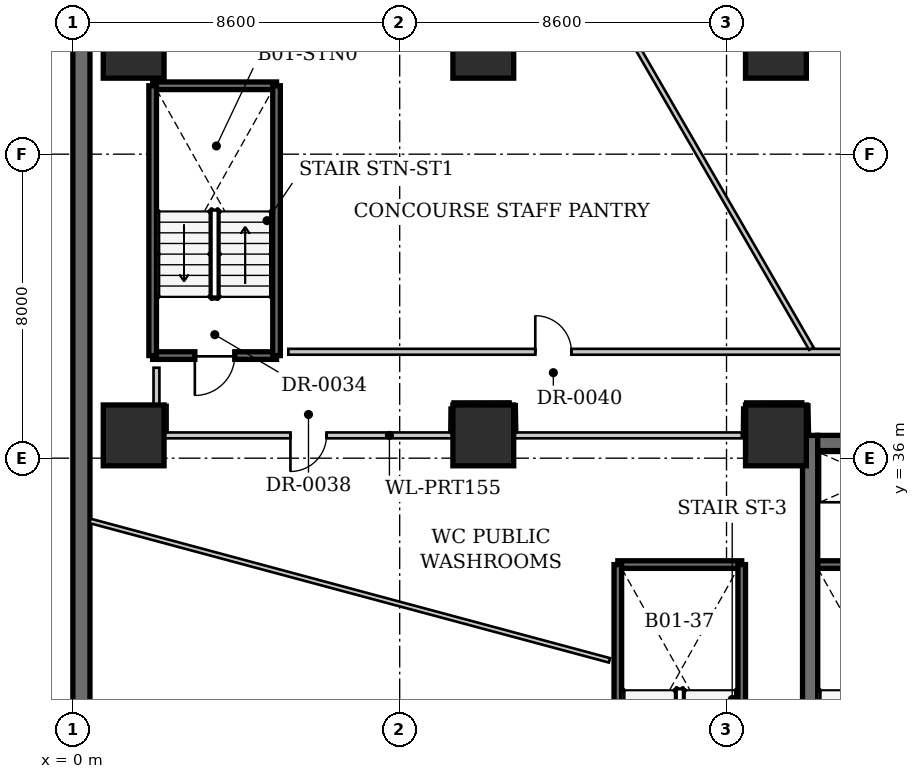
"""IFC4 building model, lengths in metres.
Left out: names, types, materials, properties, quantities, classifications, styles, units other than length and angle.
Written with IfcOpenShell. Run it as: python <this file> out.ifc"""

import sys

from ifc_helpers import new_model, si_unit, direction, frame, frame_2d, origin, origin_2d, place, context, subcontext, project, spatial, rectangle, extrude, source, transform, mapped, element, fill, save


model = new_model("IFC4")
c1 = context("Model", 3, precision=1e-05, world=origin(), true_north=direction((0.0, 1.0)))
c2 = subcontext(c1, "Body", "Model", "MODEL_VIEW")
j1 = project(units=[si_unit("LENGTHUNIT", "METRE"), si_unit("PLANEANGLEUNIT", "RADIAN")], contexts=[c1])
p1 = place(None, origin())
s1 = spatial("IfcSite", under=j1, at=p1, CompositionType="ELEMENT")
p2 = place(p1, origin())
s2 = spatial("IfcBuilding", under=s1, at=p2, CompositionType="ELEMENT")
p3 = place(p2, frame((0.0, 0.0, -5.8)))
s3 = spatial("IfcBuildingStorey", under=s2, at=p3, CompositionType="ELEMENT", Elevation=-5.8)
for number, where, z_axis, x_axis in (
    (1, (1.6, 36.6, 0.0), (0.0, 0.0, 1.0), (1.0, 0.0, 0.0)),
    (2, (1.6, 46.8, 0.0), (0.0, 0.0, 1.0), (1.0, 0.0, 0.0)),
    (3, (10.8, 46.8, 0.0), (0.0, 0.0, 1.0), (1.0, 0.0, 0.0)),
    (4, (18.5, 46.8, 0.0), (0.0, 0.0, 1.0), (1.0, 0.0, 0.0)),
    (5, (10.8, 36.6, 0.0), (0.0, 0.0, 1.0), (1.0, 0.0, 0.0)),
    (6, (18.5, 36.6, 0.0), (0.0, 0.0, 1.0), (1.0, 0.0, 0.0)),
):
    element("IfcColumn", number, at=place(p3, frame(where, z_axis=z_axis, x_axis=x_axis)), inside=s3, PredefinedType="COLUMN", context=c2, shape_type="SweptSolid", body=[
        extrude(rectangle(XDim=1.6, YDim=1.6, at=origin_2d()), origin(), (0.0, 0.0, 1.0), 5.45),
    ])
p4 = place(p3, frame((0.225, 8.225, 0.0), z_axis=(0.0, 0.0, 1.0), x_axis=(0.0, 1.0, 0.0)))
e7 = element("IfcWall", 7, at=p4, inside=s3, PredefinedType="SHEAR", context=c2, shape_type="SweptSolid", body=[
    extrude(rectangle(XDim=39.55, YDim=0.45, at=frame_2d((19.775, 0.0))), origin(), (0.0, 0.0, 1.0), 5.8),
])
p5 = place(p3, frame((19.4, 25.8, 0.0), z_axis=(0.0, 0.0, 1.0), x_axis=(0.0, 1.0, 0.0)))
e8 = element("IfcWall", 8, at=p5, inside=s3, PredefinedType="SHEAR", context=c2, shape_type="SweptSolid", body=[
    extrude(rectangle(XDim=10.8, YDim=0.4, at=frame_2d((5.4, 0.0))), origin(), (0.0, 0.0, 1.0), 5.8),
])
p6 = place(p3, frame((19.6, 36.4, 0.0), z_axis=(0.0, 0.0, 1.0), x_axis=(1.0, 0.0, 0.0)))
e9 = element("IfcWall", 9, at=p6, inside=s3, PredefinedType="SHEAR", context=c2, shape_type="SweptSolid", body=[
    extrude(rectangle(XDim=12.8, YDim=0.4, at=frame_2d((6.4, 0.0))), origin(), (0.0, 0.0, 1.0), 5.8),
])
p7 = place(p3, frame((19.6, 33.2, 0.0), z_axis=(0.0, 0.0, 1.0), x_axis=(1.0, 0.0, 0.0)))
e10 = element("IfcWall", 10, at=p7, inside=s3, PredefinedType="SHEAR", context=c2, shape_type="SweptSolid", body=[
    extrude(rectangle(XDim=3.06, YDim=0.2, at=frame_2d((1.53, 0.0))), origin(), (0.0, 0.0, 1.0), 5.8),
])
p8 = place(p3, frame((14.34, 33.2, 0.0), z_axis=(0.0, 0.0, 1.0), x_axis=(1.0, 0.0, 0.0)))
e11 = element("IfcWall", 11, at=p8, inside=s3, PredefinedType="SHEAR", context=c2, shape_type="SweptSolid", body=[
    extrude(rectangle(XDim=3.26, YDim=0.2, at=frame_2d((1.63, 0.0))), origin(), (0.0, 0.0, 1.0), 5.8),
])
for number, where, z_axis, x_axis in (
    (12, (14.34, 26.1, 0.0), (0.0, 0.0, 1.0), (0.0, 1.0, 0.0)),
    (13, (17.6, 26.1, 0.0), (0.0, 0.0, 1.0), (0.0, 1.0, 0.0)),
):
    element("IfcWall", number, at=place(p3, frame(where, z_axis=z_axis, x_axis=x_axis)), inside=s3, PredefinedType="SHEAR", context=c2, shape_type="SweptSolid", body=[
        extrude(rectangle(XDim=7.1, YDim=0.2, at=frame_2d((3.55, 0.0))), origin(), (0.0, 0.0, 1.0), 5.8),
    ])
p9 = place(p3, frame((5.36, 38.7, 0.0), z_axis=(0.0, 0.0, 1.0), x_axis=(-1.0, 0.0, 0.0)))
e14 = element("IfcWall", 14, at=p9, inside=s3, PredefinedType="SHEAR", context=c2, shape_type="SweptSolid", body=[
    extrude(rectangle(XDim=3.26, YDim=0.2, at=frame_2d((1.63, 0.0))), origin(), (0.0, 0.0, 1.0), 5.8),
])
p10 = place(p9, frame((1.1, 0.0, 0.0)))
e15 = element("IfcOpeningElement", 15, at=p10, cuts=e14, PredefinedType="OPENING", context=c2, shape_type="SweptSolid", body=[
    extrude(rectangle(XDim=1.05, YDim=2.15, at=frame_2d((0.525, 1.075))), frame((0.0, 0.11, 0.0), z_axis=(0.0, -1.0, 0.0), x_axis=(1.0, 0.0, 0.0)), (0.0, 0.0, 1.0), 0.22),
])
p11 = place(p3, frame((2.1, 45.8, 0.0), z_axis=(0.0, 0.0, 1.0), x_axis=(1.0, 0.0, 0.0)))
e16 = element("IfcWall", 16, at=p11, inside=s3, PredefinedType="SHEAR", context=c2, shape_type="SweptSolid", body=[
    extrude(rectangle(XDim=3.26, YDim=0.2, at=frame_2d((1.63, 0.0))), origin(), (0.0, 0.0, 1.0), 5.8),
])
for number, where, z_axis, x_axis in (
    (17, (2.1, 38.7, 0.0), (0.0, 0.0, 1.0), (0.0, 1.0, 0.0)),
    (18, (5.36, 38.7, 0.0), (0.0, 0.0, 1.0), (0.0, 1.0, 0.0)),
):
    element("IfcWall", number, at=place(p3, frame(where, z_axis=z_axis, x_axis=x_axis)), inside=s3, PredefinedType="SHEAR", context=c2, shape_type="SweptSolid", body=[
        extrude(rectangle(XDim=7.1, YDim=0.2, at=frame_2d((3.55, 0.0))), origin(), (0.0, 0.0, 1.0), 5.8),
    ])
p12 = place(p3, frame((9.985, 36.6, 0.0), z_axis=(0.0, 0.0, 1.0), x_axis=(-1.0, 0.0, 0.0)))
e19 = element("IfcWall", 19, at=p12, inside=s3, PredefinedType="PARTITIONING", context=c2, shape_type="SweptSolid", body=[
    extrude(rectangle(XDim=7.57, YDim=0.155, at=frame_2d((3.785, 0.0))), origin(), (0.0, 0.0, 1.0), 4.225),
])
p13 = place(p12, frame((3.31, 0.0, 0.0)))
e20 = element("IfcOpeningElement", 20, at=p13, cuts=e19, PredefinedType="OPENING", context=c2, shape_type="SweptSolid", body=[
    extrude(rectangle(XDim=0.95, YDim=2.15, at=frame_2d((0.475, 1.075))), frame((0.0, 0.087, 0.0), z_axis=(0.0, -1.0, 0.0), x_axis=(1.0, 0.0, 0.0)), (0.0, 0.0, 1.0), 0.175),
])
p14 = place(p3, frame((5.67, 38.8, 0.0), z_axis=(0.0, 0.0, 1.0), x_axis=(1.0, 0.0, 0.0)))
e21 = element("IfcWall", 21, at=p14, inside=s3, PredefinedType="PARTITIONING", context=c2, shape_type="SweptSolid", body=[
    extrude(rectangle(XDim=30.13, YDim=0.155, at=frame_2d((15.065, 0.0))), origin(), (0.0, 0.0, 1.0), 5.45),
])
p15 = place(p14, frame((19.224, 0.0, 0.0)))
e22 = element("IfcOpeningElement", 22, at=p15, cuts=e21, PredefinedType="OPENING", context=c2, shape_type="SweptSolid", body=[
    extrude(rectangle(XDim=0.95, YDim=2.15, at=frame_2d((0.475, 1.075))), frame((0.0, 0.087, 0.0), z_axis=(0.0, -1.0, 0.0), x_axis=(1.0, 0.0, 0.0)), (0.0, 0.0, 1.0), 0.175),
])
p16 = place(p14, frame((6.498, 0.0, 0.0)))
e23 = element("IfcOpeningElement", 23, at=p16, cuts=e21, PredefinedType="OPENING", context=c2, shape_type="SweptSolid", body=[
    extrude(rectangle(XDim=0.95, YDim=2.15, at=frame_2d((0.475, 1.075))), frame((0.0, 0.087, 0.0), z_axis=(0.0, -1.0, 0.0), x_axis=(1.0, 0.0, 0.0)), (0.0, 0.0, 1.0), 0.175),
])
p17 = place(p3, frame((19.315, 36.67, 0.0), z_axis=(0.0, 0.0, 1.0), x_axis=(-0.019982902894, 0.99980032186, 0.0)))
e24 = element("IfcWall", 24, at=p17, inside=s3, PredefinedType="PARTITIONING", context=c2, shape_type="SweptSolid", body=[
    extrude(rectangle(XDim=0.745, YDim=0.155, at=frame_2d((0.373, 0.0))), origin(), (0.0, 0.0, 1.0), 5.45),
])
p18 = place(p3, frame((19.217, 37.415, 0.0), z_axis=(0.0, 0.0, 1.0), x_axis=(-0.99999937099, -0.00112161442, 0.0)))
e25 = element("IfcWall", 25, at=p18, inside=s3, PredefinedType="PARTITIONING", context=c2, shape_type="SweptSolid", body=[
    extrude(rectangle(XDim=1.524, YDim=0.155, at=frame_2d((0.762, 0.0))), origin(), (0.0, 0.0, 1.0), 5.45),
])
p19 = place(p3, frame((17.692, 37.33, 0.0), z_axis=(0.0, 0.0, 1.0), x_axis=(-0.009705031542, -0.999952905072, 0.0)))
e26 = element("IfcWall", 26, at=p19, inside=s3, PredefinedType="PARTITIONING", context=c2, shape_type="SweptSolid", body=[
    extrude(rectangle(XDim=0.729, YDim=0.155, at=frame_2d((0.365, 0.0))), origin(), (0.0, 0.0, 1.0), 5.45),
])
p20 = place(p3, frame((17.602, 36.6, 0.0), z_axis=(0.0, 0.0, 1.0), x_axis=(-1.0, 0.0, 0.0)))
e27 = element("IfcWall", 27, at=p20, inside=s3, PredefinedType="PARTITIONING", context=c2, shape_type="SweptSolid", body=[
    extrude(rectangle(XDim=5.987, YDim=0.155, at=frame_2d((2.993, 0.0))), origin(), (0.0, 0.0, 1.0), 4.225),
])
p21 = place(p3, frame((11.614, 36.684, 0.0), z_axis=(0.0, 0.0, 1.0), x_axis=(-0.01835471782, 0.999831537977, 0.0)))
e28 = element("IfcWall", 28, at=p21, inside=s3, PredefinedType="PARTITIONING", context=c2, shape_type="SweptSolid", body=[
    extrude(rectangle(XDim=0.732, YDim=0.155, at=frame_2d((0.366, 0.0))), origin(), (0.0, 0.0, 1.0), 5.45),
])
p22 = place(p3, frame((11.517, 37.415, 0.0), z_axis=(0.0, 0.0, 1.0), x_axis=(-0.99999937099, -0.00112161442, 0.0)))
e29 = element("IfcWall", 29, at=p22, inside=s3, PredefinedType="PARTITIONING", context=c2, shape_type="SweptSolid", body=[
    extrude(rectangle(XDim=1.524, YDim=0.155, at=frame_2d((0.762, 0.0))), origin(), (0.0, 0.0, 1.0), 5.45),
])
p23 = place(p3, frame((9.992, 37.33, 0.0), z_axis=(0.0, 0.0, 1.0), x_axis=(-0.009825678344, -0.999951726857, 0.0)))
e30 = element("IfcWall", 30, at=p23, inside=s3, PredefinedType="PARTITIONING", context=c2, shape_type="SweptSolid", body=[
    extrude(rectangle(XDim=0.646, YDim=0.155, at=frame_2d((0.323, 0.0))), origin(), (0.0, 0.0, 1.0), 5.45),
])
p24 = place(p3, frame((2.415, 36.684, 0.0), z_axis=(0.0, 0.0, 1.0), x_axis=(-0.00067750662, 0.999999770492, 0.0)))
e31 = element("IfcWall", 31, at=p24, inside=s3, PredefinedType="PARTITIONING", context=c2, shape_type="SweptSolid", body=[
    extrude(rectangle(XDim=0.721, YDim=0.155, at=frame_2d((0.36, 0.0))), origin(), (0.0, 0.0, 1.0), 5.45),
])
p25 = place(p3, frame((2.2, 37.415, 0.0), z_axis=(0.0, 0.0, 1.0), x_axis=(0.0, 1.0, 0.0)))
e32 = element("IfcWall", 32, at=p25, inside=s3, PredefinedType="PARTITIONING", context=c2, shape_type="SweptSolid", body=[
    extrude(rectangle(XDim=0.965, YDim=0.155, at=frame_2d((0.482, 0.0))), origin(), (0.0, 0.0, 1.0), 5.45),
])
p26 = place(p3, frame((0.45, 34.35, 0.0), z_axis=(0.0, 0.0, 1.0), x_axis=(0.965797547466, -0.259297314505, 0.0)))
e33 = element("IfcWall", 33, at=p26, inside=s3, PredefinedType="PARTITIONING", context=c2, shape_type="SweptSolid", body=[
    extrude(rectangle(XDim=14.154, YDim=0.12, at=frame_2d((7.077, 0.0))), origin(), (0.0, 0.0, 1.0), 5.012),
])
p27 = place(p3, frame((19.432, 38.884, 0.0), z_axis=(0.0, 0.0, 1.0), x_axis=(-0.500625745696, 0.865663827791, 0.0)))
e34 = element("IfcWall", 34, at=p27, inside=s3, PredefinedType="PARTITIONING", context=c2, shape_type="SweptSolid", body=[
    extrude(rectangle(XDim=10.011, YDim=0.135, at=frame_2d((5.006, 0.0))), origin(), (0.0, 0.0, 1.0), 5.45),
])
m1 = source(origin(), c2, "Body", "SweptSolid", [
    extrude(rectangle(XDim=1.05, YDim=2.15, at=frame_2d((0.525, 1.075))), frame((0.0, 0.025, 0.0), z_axis=(0.0, -1.0, 0.0), x_axis=(1.0, 0.0, 0.0)), (0.0, 0.0, 1.0), 0.05),
])
p28 = place(p10, origin())
e35 = element("IfcDoor", 35, at=p28, inside=s3, OperationType="SINGLE_SWING_RIGHT", PredefinedType="DOOR", context=c2, shape_type="MappedRepresentation", body=[
    mapped(m1, transform((0.0, 0.0, 0.0), x_axis=(1.0, 0.0, 0.0), y_axis=(0.0, 1.0, 0.0), z_axis=(0.0, 0.0, 1.0), scale=1.0)),
])
fill(e15, e35)
m2 = source(origin(), c2, "Body", "SweptSolid", [
    extrude(rectangle(XDim=0.95, YDim=2.15, at=frame_2d((0.475, 1.075))), frame((0.0, 0.025, 0.0), z_axis=(0.0, -1.0, 0.0), x_axis=(1.0, 0.0, 0.0)), (0.0, 0.0, 1.0), 0.05),
])
p29 = place(p13, origin())
e36 = element("IfcDoor", 36, at=p29, inside=s3, OperationType="SINGLE_SWING_RIGHT", PredefinedType="DOOR", context=c2, shape_type="MappedRepresentation", body=[
    mapped(m2, transform((0.0, 0.0, 0.0), x_axis=(1.0, 0.0, 0.0), y_axis=(0.0, 1.0, 0.0), z_axis=(0.0, 0.0, 1.0), scale=1.0)),
])
fill(e20, e36)
p30 = place(p16, origin())
e37 = element("IfcDoor", 37, at=p30, inside=s3, OperationType="SINGLE_SWING_LEFT", PredefinedType="DOOR", context=c2, shape_type="MappedRepresentation", body=[
    mapped(m2, transform((0.0, 0.0, 0.0), x_axis=(1.0, 0.0, 0.0), y_axis=(0.0, 1.0, 0.0), z_axis=(0.0, 0.0, 1.0), scale=1.0)),
])
fill(e23, e37)
save(model, sys.argv[1])
